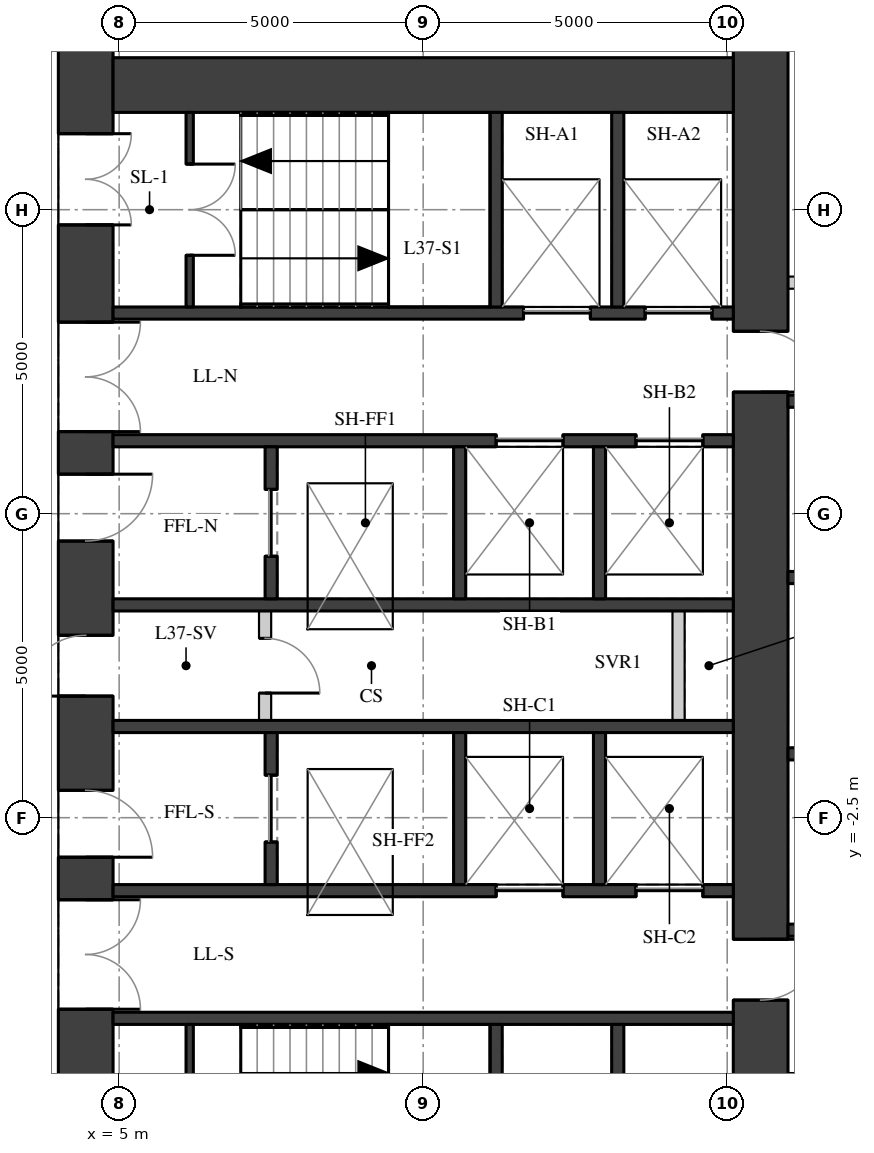
"""IFC4 building model, lengths in metres.
Left out: names, types, materials, properties, quantities, classifications, styles, units other than length and angle.
Written with IfcOpenShell. Run it as: python <this file> out.ifc"""

import sys

from ifc_helpers import new_model, si_unit, direction, frame, frame_2d, origin, place, context, subcontext, project, spatial, rectangle, extrude, element, fill, save


model = new_model("IFC4")
c1 = context("Model", 3, precision=1e-05, world=origin(), true_north=direction((0.0, 1.0)))
c2 = subcontext(c1, "Body", "Model", "MODEL_VIEW")
j1 = project(units=[si_unit("LENGTHUNIT", "METRE"), si_unit("PLANEANGLEUNIT", "RADIAN")], contexts=[c1])
p1 = place(None, origin())
s1 = spatial("IfcSite", under=j1, at=p1, CompositionType="ELEMENT")
p2 = place(p1, origin())
s2 = spatial("IfcBuilding", under=s1, at=p2, CompositionType="ELEMENT")
p3 = place(p2, frame((0.0, 0.0, 131.8)))
s3 = spatial("IfcBuildingStorey", under=s2, at=p3, CompositionType="ELEMENT", Elevation=131.8)
p4 = place(p3, frame((4.45, -11.1, 0.0), z_axis=(0.0, 0.0, 1.0), x_axis=(0.0, 1.0, 0.0)))
e1 = element("IfcWall", 1, at=p4, inside=s3, PredefinedType="SHEAR", context=c2, shape_type="SweptSolid", body=[
    extrude(rectangle(XDim=22.2, YDim=0.9, at=frame_2d((11.1, 0.0))), origin(), (0.0, 0.0, 1.0), 2.85),
])
p5 = place(p4, frame((2.35, 0.0, 0.0)))
e2 = element("IfcOpeningElement", 2, at=p5, cuts=e1, PredefinedType="OPENING", context=c2, shape_type="SweptSolid", body=[
    extrude(rectangle(XDim=1.5, YDim=2.1, at=frame_2d((0.75, 1.05))), frame((0.0, 0.46, 0.0), z_axis=(0.0, -1.0, 0.0), x_axis=(1.0, 0.0, 0.0)), (0.0, 0.0, 1.0), 0.92),
])
p6 = place(p4, frame((5.45, 0.0, 0.0)))
e3 = element("IfcOpeningElement", 3, at=p6, cuts=e1, PredefinedType="OPENING", context=c2, shape_type="SweptSolid", body=[
    extrude(rectangle(XDim=1.8, YDim=2.1, at=frame_2d((0.9, 1.05))), frame((0.0, 0.46, 0.0), z_axis=(0.0, -1.0, 0.0), x_axis=(1.0, 0.0, 0.0)), (0.0, 0.0, 1.0), 0.92),
])
p7 = place(p4, frame((7.95, 0.0, 0.0)))
e4 = element("IfcOpeningElement", 4, at=p7, cuts=e1, PredefinedType="OPENING", context=c2, shape_type="SweptSolid", body=[
    extrude(rectangle(XDim=1.1, YDim=2.1, at=frame_2d((0.55, 1.05))), frame((0.0, 0.46, 0.0), z_axis=(0.0, -1.0, 0.0), x_axis=(1.0, 0.0, 0.0)), (0.0, 0.0, 1.0), 0.92),
])
p8 = place(p4, frame((10.6, 0.0, 0.0)))
e5 = element("IfcOpeningElement", 5, at=p8, cuts=e1, PredefinedType="OPENING", context=c2, shape_type="SweptSolid", body=[
    extrude(rectangle(XDim=1.0, YDim=2.1, at=frame_2d((0.5, 1.05))), frame((0.0, 0.46, 0.0), z_axis=(0.0, -1.0, 0.0), x_axis=(1.0, 0.0, 0.0)), (0.0, 0.0, 1.0), 0.92),
])
p9 = place(p4, frame((13.15, 0.0, 0.0)))
e6 = element("IfcOpeningElement", 6, at=p9, cuts=e1, PredefinedType="OPENING", context=c2, shape_type="SweptSolid", body=[
    extrude(rectangle(XDim=1.1, YDim=2.1, at=frame_2d((0.55, 1.05))), frame((0.0, 0.46, 0.0), z_axis=(0.0, -1.0, 0.0), x_axis=(1.0, 0.0, 0.0)), (0.0, 0.0, 1.0), 0.92),
])
p10 = place(p4, frame((14.95, 0.0, 0.0)))
e7 = element("IfcOpeningElement", 7, at=p10, cuts=e1, PredefinedType="OPENING", context=c2, shape_type="SweptSolid", body=[
    extrude(rectangle(XDim=1.8, YDim=2.1, at=frame_2d((0.9, 1.05))), frame((0.0, 0.46, 0.0), z_axis=(0.0, -1.0, 0.0), x_axis=(1.0, 0.0, 0.0)), (0.0, 0.0, 1.0), 0.92),
])
p11 = place(p4, frame((18.35, 0.0, 0.0)))
e8 = element("IfcOpeningElement", 8, at=p11, cuts=e1, PredefinedType="OPENING", context=c2, shape_type="SweptSolid", body=[
    extrude(rectangle(XDim=1.5, YDim=2.1, at=frame_2d((0.75, 1.05))), frame((0.0, 0.46, 0.0), z_axis=(0.0, -1.0, 0.0), x_axis=(1.0, 0.0, 0.0)), (0.0, 0.0, 1.0), 0.92),
])
p12 = place(p3, frame((15.55, -11.1, 0.0), z_axis=(0.0, 0.0, 1.0), x_axis=(0.0, 1.0, 0.0)))
e9 = element("IfcWall", 9, at=p12, inside=s3, PredefinedType="SHEAR", context=c2, shape_type="SweptSolid", body=[
    extrude(rectangle(XDim=22.2, YDim=0.9, at=frame_2d((11.1, 0.0))), origin(), (0.0, 0.0, 1.0), 2.85),
])
p13 = place(p12, frame((15.6, 0.0, 0.0)))
e10 = element("IfcOpeningElement", 10, at=p13, cuts=e9, PredefinedType="OPENING", context=c2, shape_type="SweptSolid", body=[
    extrude(rectangle(XDim=1.0, YDim=2.1, at=frame_2d((0.5, 1.05))), frame((0.0, 0.46, 0.0), z_axis=(0.0, -1.0, 0.0), x_axis=(1.0, 0.0, 0.0)), (0.0, 0.0, 1.0), 0.92),
])
p14 = place(p12, frame((5.6, 0.0, 0.0)))
e11 = element("IfcOpeningElement", 11, at=p14, cuts=e9, PredefinedType="OPENING", context=c2, shape_type="SweptSolid", body=[
    extrude(rectangle(XDim=1.0, YDim=2.1, at=frame_2d((0.5, 1.05))), frame((0.0, 0.46, 0.0), z_axis=(0.0, -1.0, 0.0), x_axis=(1.0, 0.0, 0.0)), (0.0, 0.0, 1.0), 0.92),
])
p15 = place(p3, frame((4.9, 9.55, 0.0), z_axis=(0.0, 0.0, 1.0), x_axis=(1.0, 0.0, 0.0)))
e12 = element("IfcWall", 12, at=p15, inside=s3, PredefinedType="SHEAR", context=c2, shape_type="SweptSolid", body=[
    extrude(rectangle(XDim=10.2, YDim=0.9, at=frame_2d((5.1, 0.0))), origin(), (0.0, 0.0, 1.0), 2.85),
])
p16 = place(p3, frame((4.9, 5.8, 0.0), z_axis=(0.0, 0.0, 1.0), x_axis=(1.0, 0.0, 0.0)))
e13 = element("IfcWall", 13, at=p16, inside=s3, PredefinedType="SHEAR", context=c2, shape_type="SweptSolid", body=[
    extrude(rectangle(XDim=10.2, YDim=0.2, at=frame_2d((5.1, 0.0))), origin(), (0.0, 0.0, 1.0), 2.85),
])
p17 = place(p16, frame((6.75, 0.0, 0.0)))
e14 = element("IfcOpeningElement", 14, at=p17, cuts=e13, PredefinedType="OPENING", context=c2, shape_type="SweptSolid", body=[
    extrude(rectangle(XDim=1.1, YDim=2.1, at=frame_2d((0.55, 1.05))), frame((0.0, 0.11, 0.0), z_axis=(0.0, -1.0, 0.0), x_axis=(1.0, 0.0, 0.0)), (0.0, 0.0, 1.0), 0.22),
])
p18 = place(p16, frame((8.75, 0.0, 0.0)))
e15 = element("IfcOpeningElement", 15, at=p18, cuts=e13, PredefinedType="OPENING", context=c2, shape_type="SweptSolid", body=[
    extrude(rectangle(XDim=1.1, YDim=2.1, at=frame_2d((0.55, 1.05))), frame((0.0, 0.11, 0.0), z_axis=(0.0, -1.0, 0.0), x_axis=(1.0, 0.0, 0.0)), (0.0, 0.0, 1.0), 0.22),
])
p19 = place(p3, frame((4.9, 3.7, 0.0), z_axis=(0.0, 0.0, 1.0), x_axis=(1.0, 0.0, 0.0)))
e16 = element("IfcWall", 16, at=p19, inside=s3, PredefinedType="SHEAR", context=c2, shape_type="SweptSolid", body=[
    extrude(rectangle(XDim=10.2, YDim=0.2, at=frame_2d((5.1, 0.0))), origin(), (0.0, 0.0, 1.0), 2.85),
])
p20 = place(p19, frame((6.3, 0.0, 0.0)))
e17 = element("IfcOpeningElement", 17, at=p20, cuts=e16, PredefinedType="OPENING", context=c2, shape_type="SweptSolid", body=[
    extrude(rectangle(XDim=1.1, YDim=2.1, at=frame_2d((0.55, 1.05))), frame((0.0, 0.11, 0.0), z_axis=(0.0, -1.0, 0.0), x_axis=(1.0, 0.0, 0.0)), (0.0, 0.0, 1.0), 0.22),
])
p21 = place(p19, frame((8.6, 0.0, 0.0)))
e18 = element("IfcOpeningElement", 18, at=p21, cuts=e16, PredefinedType="OPENING", context=c2, shape_type="SweptSolid", body=[
    extrude(rectangle(XDim=1.1, YDim=2.1, at=frame_2d((0.55, 1.05))), frame((0.0, 0.11, 0.0), z_axis=(0.0, -1.0, 0.0), x_axis=(1.0, 0.0, 0.0)), (0.0, 0.0, 1.0), 0.22),
])
for number, where, z_axis, x_axis in (
    (19, (4.9, 1.0, 0.0), (0.0, 0.0, 1.0), (1.0, 0.0, 0.0)),
    (20, (4.9, -1.0, 0.0), (0.0, 0.0, 1.0), (1.0, 0.0, 0.0)),
):
    element("IfcWall", number, at=place(p3, frame(where, z_axis=z_axis, x_axis=x_axis)), inside=s3, PredefinedType="SHEAR", context=c2, shape_type="SweptSolid", body=[
        extrude(rectangle(XDim=10.2, YDim=0.2, at=frame_2d((5.1, 0.0))), origin(), (0.0, 0.0, 1.0), 2.85),
    ])
p22 = place(p3, frame((4.9, -3.7, 0.0), z_axis=(0.0, 0.0, 1.0), x_axis=(1.0, 0.0, 0.0)))
e21 = element("IfcWall", 21, at=p22, inside=s3, PredefinedType="SHEAR", context=c2, shape_type="SweptSolid", body=[
    extrude(rectangle(XDim=10.2, YDim=0.2, at=frame_2d((5.1, 0.0))), origin(), (0.0, 0.0, 1.0), 2.85),
])
p23 = place(p22, frame((6.3, 0.0, 0.0)))
e22 = element("IfcOpeningElement", 22, at=p23, cuts=e21, PredefinedType="OPENING", context=c2, shape_type="SweptSolid", body=[
    extrude(rectangle(XDim=1.1, YDim=2.1, at=frame_2d((0.55, 1.05))), frame((0.0, 0.11, 0.0), z_axis=(0.0, -1.0, 0.0), x_axis=(1.0, 0.0, 0.0)), (0.0, 0.0, 1.0), 0.22),
])
p24 = place(p22, frame((8.6, 0.0, 0.0)))
e23 = element("IfcOpeningElement", 23, at=p24, cuts=e21, PredefinedType="OPENING", context=c2, shape_type="SweptSolid", body=[
    extrude(rectangle(XDim=1.1, YDim=2.1, at=frame_2d((0.55, 1.05))), frame((0.0, 0.11, 0.0), z_axis=(0.0, -1.0, 0.0), x_axis=(1.0, 0.0, 0.0)), (0.0, 0.0, 1.0), 0.22),
])
p25 = place(p3, frame((4.9, -5.8, 0.0), z_axis=(0.0, 0.0, 1.0), x_axis=(1.0, 0.0, 0.0)))
e24 = element("IfcWall", 24, at=p25, inside=s3, PredefinedType="SHEAR", context=c2, shape_type="SweptSolid", body=[
    extrude(rectangle(XDim=10.2, YDim=0.2, at=frame_2d((5.1, 0.0))), origin(), (0.0, 0.0, 1.0), 2.85),
])
for number, where, z_axis, x_axis in (
    (25, (11.2, 5.9, 0.0), (0.0, 0.0, 1.0), (0.0, 1.0, 0.0)),
    (26, (11.2, -9.1, 0.0), (0.0, 0.0, 1.0), (0.0, 1.0, 0.0)),
    (27, (13.2, 5.9, 0.0), (0.0, 0.0, 1.0), (0.0, 1.0, 0.0)),
    (28, (13.2, -9.1, 0.0), (0.0, 0.0, 1.0), (0.0, 1.0, 0.0)),
):
    element("IfcWall", number, at=place(p3, frame(where, z_axis=z_axis, x_axis=x_axis)), inside=s3, PredefinedType="SHEAR", context=c2, shape_type="SweptSolid", body=[
        extrude(rectangle(XDim=3.2, YDim=0.2, at=frame_2d((1.6, 0.0))), origin(), (0.0, 0.0, 1.0), 2.85),
    ])
p26 = place(p3, frame((7.5, 1.1, 0.0), z_axis=(0.0, 0.0, 1.0), x_axis=(0.0, 1.0, 0.0)))
e29 = element("IfcWall", 29, at=p26, inside=s3, PredefinedType="SHEAR", context=c2, shape_type="SweptSolid", body=[
    extrude(rectangle(XDim=2.5, YDim=0.2, at=frame_2d((1.25, 0.0))), origin(), (0.0, 0.0, 1.0), 2.85),
])
p27 = place(p26, frame((0.7, 0.0, 0.0)))
e30 = element("IfcOpeningElement", 30, at=p27, cuts=e29, PredefinedType="OPENING", context=c2, shape_type="SweptSolid", body=[
    extrude(rectangle(XDim=1.1, YDim=2.1, at=frame_2d((0.55, 1.05))), frame((0.0, 0.11, 0.0), z_axis=(0.0, -1.0, 0.0), x_axis=(1.0, 0.0, 0.0)), (0.0, 0.0, 1.0), 0.22),
])
p28 = place(p3, frame((7.5, -3.6, 0.0), z_axis=(0.0, 0.0, 1.0), x_axis=(0.0, 1.0, 0.0)))
e31 = element("IfcWall", 31, at=p28, inside=s3, PredefinedType="SHEAR", context=c2, shape_type="SweptSolid", body=[
    extrude(rectangle(XDim=2.5, YDim=0.2, at=frame_2d((1.25, 0.0))), origin(), (0.0, 0.0, 1.0), 2.85),
])
p29 = place(p28, frame((0.7, 0.0, 0.0)))
e32 = element("IfcOpeningElement", 32, at=p29, cuts=e31, PredefinedType="OPENING", context=c2, shape_type="SweptSolid", body=[
    extrude(rectangle(XDim=1.1, YDim=2.1, at=frame_2d((0.55, 1.05))), frame((0.0, 0.11, 0.0), z_axis=(0.0, -1.0, 0.0), x_axis=(1.0, 0.0, 0.0)), (0.0, 0.0, 1.0), 0.22),
])
for number, where, z_axis, x_axis in (
    (33, (10.6, 1.1, 0.0), (0.0, 0.0, 1.0), (0.0, 1.0, 0.0)),
    (34, (10.6, -3.6, 0.0), (0.0, 0.0, 1.0), (0.0, 1.0, 0.0)),
    (35, (12.9, 1.1, 0.0), (0.0, 0.0, 1.0), (0.0, 1.0, 0.0)),
    (36, (12.9, -3.6, 0.0), (0.0, 0.0, 1.0), (0.0, 1.0, 0.0)),
):
    element("IfcWall", number, at=place(p3, frame(where, z_axis=z_axis, x_axis=x_axis)), inside=s3, PredefinedType="SHEAR", context=c2, shape_type="SweptSolid", body=[
        extrude(rectangle(XDim=2.5, YDim=0.2, at=frame_2d((1.25, 0.0))), origin(), (0.0, 0.0, 1.0), 2.85),
    ])
p30 = place(p3, frame((6.16, 5.9, 0.0), z_axis=(0.0, 0.0, 1.0), x_axis=(0.0, 1.0, 0.0)))
e37 = element("IfcWall", 37, at=p30, inside=s3, PredefinedType="SHEAR", context=c2, shape_type="SweptSolid", body=[
    extrude(rectangle(XDim=3.2, YDim=0.12, at=frame_2d((1.6, 0.0))), origin(), (0.0, 0.0, 1.0), 2.85),
])
p31 = place(p30, frame((0.85, 0.0, 0.0)))
e38 = element("IfcOpeningElement", 38, at=p31, cuts=e37, PredefinedType="OPENING", context=c2, shape_type="SweptSolid", body=[
    extrude(rectangle(XDim=1.5, YDim=2.1, at=frame_2d((0.75, 1.05))), frame((0.0, 0.07, 0.0), z_axis=(0.0, -1.0, 0.0), x_axis=(1.0, 0.0, 0.0)), (0.0, 0.0, 1.0), 0.14),
])
p32 = place(p3, frame((6.16, -9.1, 0.0), z_axis=(0.0, 0.0, 1.0), x_axis=(0.0, 1.0, 0.0)))
e39 = element("IfcWall", 39, at=p32, inside=s3, PredefinedType="SHEAR", context=c2, shape_type="SweptSolid", body=[
    extrude(rectangle(XDim=3.2, YDim=0.12, at=frame_2d((1.6, 0.0))), origin(), (0.0, 0.0, 1.0), 2.85),
])
p33 = place(p32, frame((0.85, 0.0, 0.0)))
e40 = element("IfcOpeningElement", 40, at=p33, cuts=e39, PredefinedType="OPENING", context=c2, shape_type="SweptSolid", body=[
    extrude(rectangle(XDim=1.5, YDim=2.1, at=frame_2d((0.75, 1.05))), frame((0.0, 0.07, 0.0), z_axis=(0.0, -1.0, 0.0), x_axis=(1.0, 0.0, 0.0)), (0.0, 0.0, 1.0), 0.14),
])
p34 = place(p3, frame((7.4, -0.9, 0.0), z_axis=(0.0, 0.0, 1.0), x_axis=(0.0, 1.0, 0.0)))
e41 = element("IfcWall", 41, at=p34, inside=s3, PredefinedType="PARTITIONING", context=c2, shape_type="SweptSolid", body=[
    extrude(rectangle(XDim=1.8, YDim=0.2, at=frame_2d((0.9, 0.0))), origin(), (0.0, 0.0, 1.0), 2.85),
])
p35 = place(p34, frame((0.45, 0.0, 0.0)))
e42 = element("IfcOpeningElement", 42, at=p35, cuts=e41, PredefinedType="OPENING", context=c2, shape_type="SweptSolid", body=[
    extrude(rectangle(XDim=0.9, YDim=2.1, at=frame_2d((0.45, 1.05))), frame((0.0, 0.11, 0.0), z_axis=(0.0, -1.0, 0.0), x_axis=(1.0, 0.0, 0.0)), (0.0, 0.0, 1.0), 0.22),
])
p36 = place(p3, frame((14.2, -0.9, 0.0), z_axis=(0.0, 0.0, 1.0), x_axis=(0.0, 1.0, 0.0)))
e43 = element("IfcWall", 43, at=p36, inside=s3, PredefinedType="PARTITIONING", context=c2, shape_type="SweptSolid", body=[
    extrude(rectangle(XDim=1.8, YDim=0.2, at=frame_2d((0.9, 0.0))), origin(), (0.0, 0.0, 1.0), 2.85),
])
for number, where, z_axis, x_axis in (
    (44, (16.0, -4.35, 0.0), (0.0, 0.0, 1.0), (1.0, 0.0, 0.0)),
    (45, (16.0, -1.45, 0.0), (0.0, 0.0, 1.0), (1.0, 0.0, 0.0)),
    (46, (16.0, 1.45, 0.0), (0.0, 0.0, 1.0), (1.0, 0.0, 0.0)),
    (47, (16.0, 4.35, 0.0), (0.0, 0.0, 1.0), (1.0, 0.0, 0.0)),
):
    element("IfcWall", number, at=place(p3, frame(where, z_axis=z_axis, x_axis=x_axis)), inside=s3, PredefinedType="SHEAR", context=c2, shape_type="SweptSolid", body=[
        extrude(rectangle(XDim=2.3, YDim=0.2, at=frame_2d((1.15, 0.0))), origin(), (0.0, 0.0, 1.0), 2.85),
    ])
p37 = place(p3, frame((16.0, 6.3, 0.0), z_axis=(0.0, 0.0, 1.0), x_axis=(1.0, 0.0, 0.0)))
e48 = element("IfcWall", 48, at=p37, inside=s3, PredefinedType="PARTITIONING", context=c2, shape_type="SweptSolid", body=[
    extrude(rectangle(XDim=2.3, YDim=0.2, at=frame_2d((1.15, 0.0))), origin(), (0.0, 0.0, 1.0), 2.85),
])
p38 = place(p37, frame((0.3, 0.0, 0.0)))
e49 = element("IfcOpeningElement", 49, at=p38, cuts=e48, PredefinedType="OPENING", context=c2, shape_type="SweptSolid", body=[
    extrude(rectangle(XDim=0.9, YDim=2.1, at=frame_2d((0.45, 1.05))), frame((0.0, 0.11, 0.0), z_axis=(0.0, -1.0, 0.0), x_axis=(1.0, 0.0, 0.0)), (0.0, 0.0, 1.0), 0.22),
])
p39 = place(p6, origin())
e50 = element("IfcDoor", 50, at=p39, inside=s3, OperationType="DOUBLE_DOOR_SINGLE_SWING", PredefinedType="DOOR", context=c2, shape_type="SweptSolid", body=[
    extrude(rectangle(XDim=1.8, YDim=2.1, at=frame_2d((0.9, 1.05))), frame((0.0, 0.025, 0.0), z_axis=(0.0, -1.0, 0.0), x_axis=(1.0, 0.0, 0.0)), (0.0, 0.0, 1.0), 0.05),
])
fill(e3, e50)
p40 = place(p7, origin())
e51 = element("IfcDoor", 51, at=p40, inside=s3, OperationType="SINGLE_SWING_RIGHT", PredefinedType="DOOR", context=c2, shape_type="SweptSolid", body=[
    extrude(rectangle(XDim=1.1, YDim=2.1, at=frame_2d((0.55, 1.05))), frame((0.0, 0.025, 0.0), z_axis=(0.0, -1.0, 0.0), x_axis=(1.0, 0.0, 0.0)), (0.0, 0.0, 1.0), 0.05),
])
fill(e4, e51)
p41 = place(p8, origin())
e52 = element("IfcDoor", 52, at=p41, inside=s3, OperationType="SINGLE_SWING_LEFT", PredefinedType="DOOR", context=c2, shape_type="SweptSolid", body=[
    extrude(rectangle(XDim=1.0, YDim=2.1, at=frame_2d((0.5, 1.05))), frame((0.0, 0.025, 0.0), z_axis=(0.0, -1.0, 0.0), x_axis=(1.0, 0.0, 0.0)), (0.0, 0.0, 1.0), 0.05),
])
fill(e5, e52)
p42 = place(p9, origin())
e53 = element("IfcDoor", 53, at=p42, inside=s3, OperationType="SINGLE_SWING_LEFT", PredefinedType="DOOR", context=c2, shape_type="SweptSolid", body=[
    extrude(rectangle(XDim=1.1, YDim=2.1, at=frame_2d((0.55, 1.05))), frame((0.0, 0.025, 0.0), z_axis=(0.0, -1.0, 0.0), x_axis=(1.0, 0.0, 0.0)), (0.0, 0.0, 1.0), 0.05),
])
fill(e6, e53)
p43 = place(p10, origin())
e54 = element("IfcDoor", 54, at=p43, inside=s3, OperationType="DOUBLE_DOOR_SINGLE_SWING", PredefinedType="DOOR", context=c2, shape_type="SweptSolid", body=[
    extrude(rectangle(XDim=1.8, YDim=2.1, at=frame_2d((0.9, 1.05))), frame((0.0, 0.025, 0.0), z_axis=(0.0, -1.0, 0.0), x_axis=(1.0, 0.0, 0.0)), (0.0, 0.0, 1.0), 0.05),
])
fill(e7, e54)
p44 = place(p11, origin())
e55 = element("IfcDoor", 55, at=p44, inside=s3, OperationType="DOUBLE_DOOR_SINGLE_SWING", PredefinedType="DOOR", context=c2, shape_type="SweptSolid", body=[
    extrude(rectangle(XDim=1.5, YDim=2.1, at=frame_2d((0.75, 1.05))), frame((0.0, 0.025, 0.0), z_axis=(0.0, -1.0, 0.0), x_axis=(1.0, 0.0, 0.0)), (0.0, 0.0, 1.0), 0.05),
])
fill(e8, e55)
p45 = place(p31, origin())
e56 = element("IfcDoor", 56, at=p45, inside=s3, OperationType="DOUBLE_DOOR_SINGLE_SWING", PredefinedType="DOOR", context=c2, shape_type="SweptSolid", body=[
    extrude(rectangle(XDim=1.5, YDim=2.1, at=frame_2d((0.75, 1.05))), frame((0.0, 0.025, 0.0), z_axis=(0.0, -1.0, 0.0), x_axis=(1.0, 0.0, 0.0)), (0.0, 0.0, 1.0), 0.05),
])
fill(e38, e56)
p46 = place(p17, origin())
e57 = element("IfcDoor", 57, at=p46, inside=s3, OperationType="DOUBLE_DOOR_SLIDING", PredefinedType="DOOR", context=c2, shape_type="SweptSolid", body=[
    extrude(rectangle(XDim=1.1, YDim=2.1, at=frame_2d((0.55, 1.05))), frame((0.0, 0.025, 0.0), z_axis=(0.0, -1.0, 0.0), x_axis=(1.0, 0.0, 0.0)), (0.0, 0.0, 1.0), 0.05),
])
fill(e14, e57)
p47 = place(p18, origin())
e58 = element("IfcDoor", 58, at=p47, inside=s3, OperationType="DOUBLE_DOOR_SLIDING", PredefinedType="DOOR", context=c2, shape_type="SweptSolid", body=[
    extrude(rectangle(XDim=1.1, YDim=2.1, at=frame_2d((0.55, 1.05))), frame((0.0, 0.025, 0.0), z_axis=(0.0, -1.0, 0.0), x_axis=(1.0, 0.0, 0.0)), (0.0, 0.0, 1.0), 0.05),
])
fill(e15, e58)
p48 = place(p20, origin())
e59 = element("IfcDoor", 59, at=p48, inside=s3, OperationType="DOUBLE_DOOR_SLIDING", PredefinedType="DOOR", context=c2, shape_type="SweptSolid", body=[
    extrude(rectangle(XDim=1.1, YDim=2.1, at=frame_2d((0.55, 1.05))), frame((0.0, 0.025, 0.0), z_axis=(0.0, -1.0, 0.0), x_axis=(1.0, 0.0, 0.0)), (0.0, 0.0, 1.0), 0.05),
])
fill(e17, e59)
p49 = place(p21, origin())
e60 = element("IfcDoor", 60, at=p49, inside=s3, OperationType="DOUBLE_DOOR_SLIDING", PredefinedType="DOOR", context=c2, shape_type="SweptSolid", body=[
    extrude(rectangle(XDim=1.1, YDim=2.1, at=frame_2d((0.55, 1.05))), frame((0.0, 0.025, 0.0), z_axis=(0.0, -1.0, 0.0), x_axis=(1.0, 0.0, 0.0)), (0.0, 0.0, 1.0), 0.05),
])
fill(e18, e60)
p50 = place(p23, origin())
e61 = element("IfcDoor", 61, at=p50, inside=s3, OperationType="DOUBLE_DOOR_SLIDING", PredefinedType="DOOR", context=c2, shape_type="SweptSolid", body=[
    extrude(rectangle(XDim=1.1, YDim=2.1, at=frame_2d((0.55, 1.05))), frame((0.0, 0.025, 0.0), z_axis=(0.0, -1.0, 0.0), x_axis=(1.0, 0.0, 0.0)), (0.0, 0.0, 1.0), 0.05),
])
fill(e22, e61)
p51 = place(p24, origin())
e62 = element("IfcDoor", 62, at=p51, inside=s3, OperationType="DOUBLE_DOOR_SLIDING", PredefinedType="DOOR", context=c2, shape_type="SweptSolid", body=[
    extrude(rectangle(XDim=1.1, YDim=2.1, at=frame_2d((0.55, 1.05))), frame((0.0, 0.025, 0.0), z_axis=(0.0, -1.0, 0.0), x_axis=(1.0, 0.0, 0.0)), (0.0, 0.0, 1.0), 0.05),
])
fill(e23, e62)
p52 = place(p27, origin())
e63 = element("IfcDoor", 63, at=p52, inside=s3, OperationType="DOUBLE_DOOR_SLIDING", PredefinedType="DOOR", context=c2, shape_type="SweptSolid", body=[
    extrude(rectangle(XDim=1.1, YDim=2.1, at=frame_2d((0.55, 1.05))), frame((0.0, 0.025, 0.0), z_axis=(0.0, -1.0, 0.0), x_axis=(1.0, 0.0, 0.0)), (0.0, 0.0, 1.0), 0.05),
])
fill(e30, e63)
p53 = place(p29, origin())
e64 = element("IfcDoor", 64, at=p53, inside=s3, OperationType="DOUBLE_DOOR_SLIDING", PredefinedType="DOOR", context=c2, shape_type="SweptSolid", body=[
    extrude(rectangle(XDim=1.1, YDim=2.1, at=frame_2d((0.55, 1.05))), frame((0.0, 0.025, 0.0), z_axis=(0.0, -1.0, 0.0), x_axis=(1.0, 0.0, 0.0)), (0.0, 0.0, 1.0), 0.05),
])
fill(e32, e64)
p54 = place(p35, origin())
e65 = element("IfcDoor", 65, at=p54, inside=s3, OperationType="SINGLE_SWING_RIGHT", PredefinedType="DOOR", context=c2, shape_type="SweptSolid", body=[
    extrude(rectangle(XDim=0.9, YDim=2.1, at=frame_2d((0.45, 1.05))), frame((0.0, 0.025, 0.0), z_axis=(0.0, -1.0, 0.0), x_axis=(1.0, 0.0, 0.0)), (0.0, 0.0, 1.0), 0.05),
])
fill(e42, e65)
p55 = place(p13, origin())
e66 = element("IfcDoor", 66, at=p55, inside=s3, OperationType="SINGLE_SWING_RIGHT", PredefinedType="DOOR", context=c2, shape_type="SweptSolid", body=[
    extrude(rectangle(XDim=1.0, YDim=2.1, at=frame_2d((0.5, 1.05))), frame((0.0, 0.025, 0.0), z_axis=(0.0, -1.0, 0.0), x_axis=(1.0, 0.0, 0.0)), (0.0, 0.0, 1.0), 0.05),
])
fill(e10, e66)
p56 = place(p14, origin())
e67 = element("IfcDoor", 67, at=p56, inside=s3, OperationType="SINGLE_SWING_LEFT", PredefinedType="DOOR", context=c2, shape_type="SweptSolid", body=[
    extrude(rectangle(XDim=1.0, YDim=2.1, at=frame_2d((0.5, 1.05))), frame((0.0, 0.025, 0.0), z_axis=(0.0, -1.0, 0.0), x_axis=(1.0, 0.0, 0.0)), (0.0, 0.0, 1.0), 0.05),
])
fill(e11, e67)
save(model, sys.argv[1])
